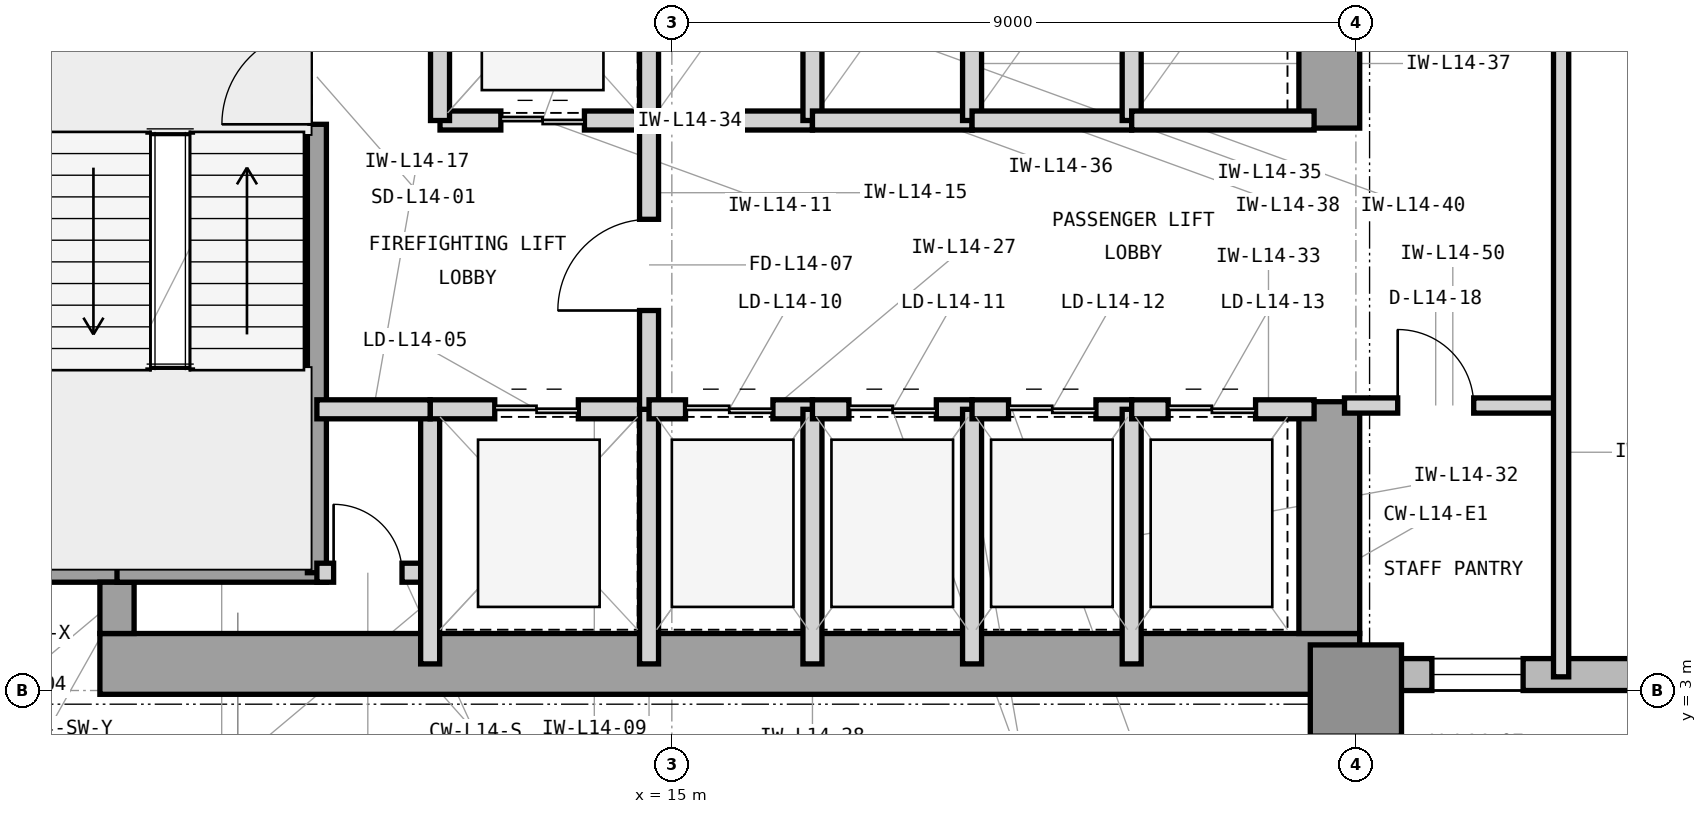
"""IFC4 building model, lengths in metres.
Left out: names, types, materials, properties, quantities, classifications, styles, units other than length and angle.
Written with IfcOpenShell. Run it as: python <this file> out.ifc"""

import sys

from ifc_helpers import new_model, si_unit, direction, frame, frame_2d, origin, origin_2d, place, context, subcontext, project, spatial, rectangle, extrude, element, fill, save


model = new_model("IFC4")
c1 = context("Model", 3, precision=1e-05, world=origin(), true_north=direction((0.0, 1.0)))
c2 = subcontext(c1, "Body", "Model", "MODEL_VIEW")
j1 = project(units=[si_unit("LENGTHUNIT", "METRE"), si_unit("PLANEANGLEUNIT", "RADIAN")], contexts=[c1])
p1 = place(None, origin())
s1 = spatial("IfcSite", under=j1, at=p1, CompositionType="ELEMENT")
p2 = place(p1, origin())
s2 = spatial("IfcBuilding", under=s1, at=p2, CompositionType="ELEMENT")
p3 = place(p2, frame((0.0, 0.0, 63.6)))
s3 = spatial("IfcBuildingStorey", under=s2, at=p3, CompositionType="ELEMENT", Elevation=63.6)
p4 = place(p3, frame((7.475, 3.35, 0.0), z_axis=(0.0, 0.0, 1.0), x_axis=(1.0, 0.0, 0.0)))
e1 = element("IfcWall", 1, at=p4, inside=s3, PredefinedType="SHEAR", context=c2, shape_type="SweptSolid", body=[
    extrude(rectangle(XDim=16.575, YDim=0.8, at=frame_2d((8.288, 0.0))), origin(), (0.0, 0.0, 1.0), 4.2),
])
p5 = place(p3, frame((23.65, 3.75, 0.0), z_axis=(0.0, 0.0, 1.0), x_axis=(0.0, 1.0, 0.0)))
e2 = element("IfcWall", 2, at=p5, inside=s3, PredefinedType="SHEAR", context=c2, shape_type="SweptSolid", body=[
    extrude(rectangle(XDim=3.05, YDim=0.8, at=frame_2d((1.525, 0.0))), origin(), (0.0, 0.0, 1.0), 4.2),
])
p6 = place(p3, frame((23.65, 10.4, 0.0), z_axis=(0.0, 0.0, 1.0), x_axis=(0.0, 1.0, 0.0)))
e3 = element("IfcWall", 3, at=p6, inside=s3, PredefinedType="SHEAR", context=c2, shape_type="SweptSolid", body=[
    extrude(rectangle(XDim=3.2, YDim=0.8, at=frame_2d((1.6, 0.0))), origin(), (0.0, 0.0, 1.0), 4.2),
])
p7 = place(p3, frame((6.75, 4.65, 0.0), z_axis=(0.0, 0.0, 1.0), x_axis=(1.0, 0.0, 0.0)))
e4 = element("IfcWall", 4, at=p7, inside=s3, PredefinedType="SHEAR", context=c2, shape_type="SweptSolid", body=[
    extrude(rectangle(XDim=1.175, YDim=0.45, at=frame_2d((0.587, 0.0))), origin(), (0.0, 0.0, 1.0), 4.2),
])
p8 = place(p3, frame((7.7, 3.75, 0.0), z_axis=(0.0, 0.0, 1.0), x_axis=(0.0, 1.0, 0.0)))
e5 = element("IfcWall", 5, at=p8, inside=s3, PredefinedType="SHEAR", context=c2, shape_type="SweptSolid", body=[
    extrude(rectangle(XDim=0.675, YDim=0.45, at=frame_2d((0.337, 0.0))), origin(), (0.0, 0.0, 1.0), 4.2),
])
p9 = place(p3, frame((24.0, 3.0, 0.0), z_axis=(0.0, 0.0, 1.0), x_axis=(1.0, 0.0, 0.0)))
e6 = element("IfcColumn", 6, at=p9, inside=s3, PredefinedType="COLUMN", context=c2, shape_type="SweptSolid", body=[
    extrude(rectangle(XDim=1.2, YDim=1.2, at=origin_2d()), origin(), (0.0, 0.0, 1.0), 4.2),
])
p10 = place(p3, frame((23.9, 3.21, 0.0), z_axis=(0.0, 0.0, 1.0), x_axis=(1.0, 0.0, 0.0)))
e7 = element("IfcWall", 7, at=p10, inside=s3, PredefinedType="STANDARD", context=c2, shape_type="SweptSolid", body=[
    extrude(rectangle(XDim=40.5, YDim=0.42, at=frame_2d((20.25, 0.0))), origin(), (0.0, 0.0, 1.0), 3.98),
])
p11 = place(p10, frame((1.1, 0.0, 0.85)))
e8 = element("IfcOpeningElement", 8, at=p11, cuts=e7, PredefinedType="OPENING", context=c2, shape_type="SweptSolid", body=[
    extrude(rectangle(XDim=1.2, YDim=2.45, at=frame_2d((0.6, 1.225))), frame((0.0, 0.22, 0.0), z_axis=(0.0, -1.0, 0.0), x_axis=(1.0, 0.0, 0.0)), (0.0, 0.0, 1.0), 0.44),
])
p12 = place(p10, frame((5.136, 0.0, 0.85)))
e9 = element("IfcOpeningElement", 9, at=p12, cuts=e7, PredefinedType="OPENING", context=c2, shape_type="SweptSolid", body=[
    extrude(rectangle(XDim=2.8, YDim=2.45, at=frame_2d((1.4, 1.225))), frame((0.0, 0.22, 0.0), z_axis=(0.0, -1.0, 0.0), x_axis=(1.0, 0.0, 0.0)), (0.0, 0.0, 1.0), 0.44),
])
p13 = place(p10, frame((12.636, 0.0, 0.85)))
e10 = element("IfcOpeningElement", 10, at=p13, cuts=e7, PredefinedType="OPENING", context=c2, shape_type="SweptSolid", body=[
    extrude(rectangle(XDim=2.8, YDim=2.45, at=frame_2d((1.4, 1.225))), frame((0.0, 0.22, 0.0), z_axis=(0.0, -1.0, 0.0), x_axis=(1.0, 0.0, 0.0)), (0.0, 0.0, 1.0), 0.44),
])
p14 = place(p10, frame((20.336, 0.0, 0.85)))
e11 = element("IfcOpeningElement", 11, at=p14, cuts=e7, PredefinedType="OPENING", context=c2, shape_type="SweptSolid", body=[
    extrude(rectangle(XDim=2.8, YDim=2.45, at=frame_2d((1.4, 1.225))), frame((0.0, 0.22, 0.0), z_axis=(0.0, -1.0, 0.0), x_axis=(1.0, 0.0, 0.0)), (0.0, 0.0, 1.0), 0.44),
])
p15 = place(p10, frame((30.886, 0.0, 0.85)))
e12 = element("IfcOpeningElement", 12, at=p15, cuts=e7, PredefinedType="OPENING", context=c2, shape_type="SweptSolid", body=[
    extrude(rectangle(XDim=1.2, YDim=2.45, at=frame_2d((0.6, 1.225))), frame((0.0, 0.22, 0.0), z_axis=(0.0, -1.0, 0.0), x_axis=(1.0, 0.0, 0.0)), (0.0, 0.0, 1.0), 0.44),
])
p16 = place(p3, frame((7.7, 4.55, 0.0), z_axis=(0.0, 0.0, 1.0), x_axis=(1.0, 0.0, 0.0)))
e13 = element("IfcWall", 13, at=p16, inside=s3, PredefinedType="SHEAR", context=c2, shape_type="SweptSolid", body=[
    extrude(rectangle(XDim=2.755, YDim=0.25, at=frame_2d((1.377, 0.0))), origin(), (0.0, 0.0, 1.0), 4.2),
])
p17 = place(p3, frame((10.33, 4.55, 0.0), z_axis=(0.0, 0.0, 1.0), x_axis=(0.0, 1.0, 0.0)))
e14 = element("IfcWall", 14, at=p17, inside=s3, PredefinedType="SHEAR", context=c2, shape_type="SweptSolid", body=[
    extrude(rectangle(XDim=7.45, YDim=0.25, at=frame_2d((3.725, 0.0))), origin(), (0.0, 0.0, 1.0), 4.2),
])
p18 = place(p17, frame((5.9, 0.0, 0.0)))
e15 = element("IfcOpeningElement", 15, at=p18, cuts=e14, PredefinedType="OPENING", context=c2, shape_type="SweptSolid", body=[
    extrude(rectangle(XDim=1.25, YDim=2.2, at=frame_2d((0.625, 1.1))), frame((0.0, 0.135, 0.0), z_axis=(0.0, -1.0, 0.0), x_axis=(1.0, 0.0, 0.0)), (0.0, 0.0, 1.0), 0.27),
])
p19 = place(p3, frame((10.33, 4.55, 0.0), z_axis=(0.0, 0.0, 1.0), x_axis=(1.0, 0.0, 0.0)))
e16 = element("IfcWall", 16, at=p19, inside=s3, PredefinedType="PARTITIONING", context=c2, shape_type="SweptSolid", body=[
    extrude(rectangle(XDim=1.49, YDim=0.25, at=frame_2d((0.745, 0.0))), origin(), (0.0, 0.0, 1.0), 3.97),
])
p20 = place(p19, frame((0.22, 0.0, 0.0)))
e17 = element("IfcOpeningElement", 17, at=p20, cuts=e16, PredefinedType="OPENING", context=c2, shape_type="SweptSolid", body=[
    extrude(rectangle(XDim=0.9, YDim=2.1, at=frame_2d((0.45, 1.05))), frame((0.0, 0.135, 0.0), z_axis=(0.0, -1.0, 0.0), x_axis=(1.0, 0.0, 0.0)), (0.0, 0.0, 1.0), 0.27),
])
p21 = place(p3, frame((11.82, 3.35, 0.0), z_axis=(0.0, 0.0, 1.0), x_axis=(0.0, 1.0, 0.0)))
e18 = element("IfcWall", 18, at=p21, inside=s3, PredefinedType="PARTITIONING", context=c2, shape_type="SweptSolid", body=[
    extrude(rectangle(XDim=3.35, YDim=0.25, at=frame_2d((1.675, 0.0))), origin(), (0.0, 0.0, 1.0), 3.97),
])
p22 = place(p3, frame((11.82, 6.7, 0.0), z_axis=(0.0, 0.0, 1.0), x_axis=(1.0, 0.0, 0.0)))
e19 = element("IfcWall", 19, at=p22, inside=s3, PredefinedType="PARTITIONING", context=c2, shape_type="SweptSolid", body=[
    extrude(rectangle(XDim=2.88, YDim=0.25, at=frame_2d((1.44, 0.0))), origin(), (0.0, 0.0, 1.0), 3.426),
])
p23 = place(p22, frame((0.85, 0.0, 0.0)))
e20 = element("IfcOpeningElement", 20, at=p23, cuts=e19, PredefinedType="OPENING", context=c2, shape_type="SweptSolid", body=[
    extrude(rectangle(XDim=1.1, YDim=2.25, at=frame_2d((0.55, 1.125))), frame((0.0, 0.135, 0.0), z_axis=(0.0, -1.0, 0.0), x_axis=(1.0, 0.0, 0.0)), (0.0, 0.0, 1.0), 0.27),
])
p24 = place(p3, frame((14.7, 3.35, 0.0), z_axis=(0.0, 0.0, 1.0), x_axis=(0.0, 1.0, 0.0)))
e21 = element("IfcWall", 21, at=p24, inside=s3, PredefinedType="PARTITIONING", context=c2, shape_type="SweptSolid", body=[
    extrude(rectangle(XDim=3.35, YDim=0.25, at=frame_2d((1.675, 0.0))), origin(), (0.0, 0.0, 1.0), 3.97),
])
p25 = place(p3, frame((11.95, 10.5, 0.0), z_axis=(0.0, 0.0, 1.0), x_axis=(1.0, 0.0, 0.0)))
e22 = element("IfcWall", 22, at=p25, inside=s3, PredefinedType="PARTITIONING", context=c2, shape_type="SweptSolid", body=[
    extrude(rectangle(XDim=2.75, YDim=0.25, at=frame_2d((1.375, 0.0))), origin(), (0.0, 0.0, 1.0), 3.426),
])
p26 = place(p25, frame((0.8, 0.0, 0.0)))
e23 = element("IfcOpeningElement", 23, at=p26, cuts=e22, PredefinedType="OPENING", context=c2, shape_type="SweptSolid", body=[
    extrude(rectangle(XDim=1.1, YDim=2.25, at=frame_2d((0.55, 1.125))), frame((0.0, 0.135, 0.0), z_axis=(0.0, -1.0, 0.0), x_axis=(1.0, 0.0, 0.0)), (0.0, 0.0, 1.0), 0.27),
])
for number, where, z_axis, x_axis in (
    (24, (11.95, 10.5, 0.0), (0.0, 0.0, 1.0), (0.0, 1.0, 0.0)),
    (25, (14.7, 10.5, 0.0), (0.0, 0.0, 1.0), (0.0, 1.0, 0.0)),
):
    element("IfcWall", number, at=place(p3, frame(where, z_axis=z_axis, x_axis=x_axis)), inside=s3, PredefinedType="PARTITIONING", context=c2, shape_type="SweptSolid", body=[
        extrude(rectangle(XDim=3.0, YDim=0.25, at=frame_2d((1.5, 0.0))), origin(), (0.0, 0.0, 1.0), 3.97),
    ])
p27 = place(p3, frame((14.7, 6.7, 0.0), z_axis=(0.0, 0.0, 1.0), x_axis=(0.0, 1.0, 0.0)))
e26 = element("IfcWall", 26, at=p27, inside=s3, PredefinedType="PARTITIONING", context=c2, shape_type="SweptSolid", body=[
    extrude(rectangle(XDim=3.8, YDim=0.25, at=frame_2d((1.9, 0.0))), origin(), (0.0, 0.0, 1.0), 3.97),
])
p28 = place(p27, frame((1.3, 0.0, 0.0)))
e27 = element("IfcOpeningElement", 27, at=p28, cuts=e26, PredefinedType="OPENING", context=c2, shape_type="SweptSolid", body=[
    extrude(rectangle(XDim=1.2, YDim=2.2, at=frame_2d((0.6, 1.1))), frame((0.0, 0.135, 0.0), z_axis=(0.0, -1.0, 0.0), x_axis=(1.0, 0.0, 0.0)), (0.0, 0.0, 1.0), 0.27),
])
p29 = place(p3, frame((10.33, 6.7, 0.0), z_axis=(0.0, 0.0, 1.0), x_axis=(1.0, 0.0, 0.0)))
e28 = element("IfcWall", 28, at=p29, inside=s3, PredefinedType="PARTITIONING", context=c2, shape_type="SweptSolid", body=[
    extrude(rectangle(XDim=1.49, YDim=0.25, at=frame_2d((0.745, 0.0))), origin(), (0.0, 0.0, 1.0), 3.426),
])
p30 = place(p3, frame((14.7, 6.7, 0.0), z_axis=(0.0, 0.0, 1.0), x_axis=(1.0, 0.0, 0.0)))
e29 = element("IfcWall", 29, at=p30, inside=s3, PredefinedType="PARTITIONING", context=c2, shape_type="SweptSolid", body=[
    extrude(rectangle(XDim=2.15, YDim=0.25, at=frame_2d((1.075, 0.0))), origin(), (0.0, 0.0, 1.0), 3.426),
])
p31 = place(p30, frame((0.48, 0.0, 0.0)))
e30 = element("IfcOpeningElement", 30, at=p31, cuts=e29, PredefinedType="OPENING", context=c2, shape_type="SweptSolid", body=[
    extrude(rectangle(XDim=1.15, YDim=2.25, at=frame_2d((0.575, 1.125))), frame((0.0, 0.135, 0.0), z_axis=(0.0, -1.0, 0.0), x_axis=(1.0, 0.0, 0.0)), (0.0, 0.0, 1.0), 0.27),
])
p32 = place(p3, frame((16.85, 3.35, 0.0), z_axis=(0.0, 0.0, 1.0), x_axis=(0.0, 1.0, 0.0)))
e31 = element("IfcWall", 31, at=p32, inside=s3, PredefinedType="PARTITIONING", context=c2, shape_type="SweptSolid", body=[
    extrude(rectangle(XDim=3.35, YDim=0.25, at=frame_2d((1.675, 0.0))), origin(), (0.0, 0.0, 1.0), 3.97),
])
p33 = place(p3, frame((16.85, 6.7, 0.0), z_axis=(0.0, 0.0, 1.0), x_axis=(1.0, 0.0, 0.0)))
e32 = element("IfcWall", 32, at=p33, inside=s3, PredefinedType="PARTITIONING", context=c2, shape_type="SweptSolid", body=[
    extrude(rectangle(XDim=2.1, YDim=0.25, at=frame_2d((1.05, 0.0))), origin(), (0.0, 0.0, 1.0), 3.426),
])
p34 = place(p33, frame((0.48, 0.0, 0.0)))
e33 = element("IfcOpeningElement", 33, at=p34, cuts=e32, PredefinedType="OPENING", context=c2, shape_type="SweptSolid", body=[
    extrude(rectangle(XDim=1.15, YDim=2.25, at=frame_2d((0.575, 1.125))), frame((0.0, 0.135, 0.0), z_axis=(0.0, -1.0, 0.0), x_axis=(1.0, 0.0, 0.0)), (0.0, 0.0, 1.0), 0.27),
])
p35 = place(p3, frame((18.95, 3.35, 0.0), z_axis=(0.0, 0.0, 1.0), x_axis=(0.0, 1.0, 0.0)))
e34 = element("IfcWall", 34, at=p35, inside=s3, PredefinedType="PARTITIONING", context=c2, shape_type="SweptSolid", body=[
    extrude(rectangle(XDim=3.35, YDim=0.25, at=frame_2d((1.675, 0.0))), origin(), (0.0, 0.0, 1.0), 3.97),
])
p36 = place(p3, frame((18.95, 6.7, 0.0), z_axis=(0.0, 0.0, 1.0), x_axis=(1.0, 0.0, 0.0)))
e35 = element("IfcWall", 35, at=p36, inside=s3, PredefinedType="PARTITIONING", context=c2, shape_type="SweptSolid", body=[
    extrude(rectangle(XDim=2.1, YDim=0.25, at=frame_2d((1.05, 0.0))), origin(), (0.0, 0.0, 1.0), 3.426),
])
p37 = place(p36, frame((0.48, 0.0, 0.0)))
e36 = element("IfcOpeningElement", 36, at=p37, cuts=e35, PredefinedType="OPENING", context=c2, shape_type="SweptSolid", body=[
    extrude(rectangle(XDim=1.15, YDim=2.25, at=frame_2d((0.575, 1.125))), frame((0.0, 0.135, 0.0), z_axis=(0.0, -1.0, 0.0), x_axis=(1.0, 0.0, 0.0)), (0.0, 0.0, 1.0), 0.27),
])
p38 = place(p3, frame((21.05, 3.35, 0.0), z_axis=(0.0, 0.0, 1.0), x_axis=(0.0, 1.0, 0.0)))
e37 = element("IfcWall", 37, at=p38, inside=s3, PredefinedType="PARTITIONING", context=c2, shape_type="SweptSolid", body=[
    extrude(rectangle(XDim=3.35, YDim=0.25, at=frame_2d((1.675, 0.0))), origin(), (0.0, 0.0, 1.0), 3.97),
])
p39 = place(p3, frame((21.05, 6.7, 0.0), z_axis=(0.0, 0.0, 1.0), x_axis=(1.0, 0.0, 0.0)))
e38 = element("IfcWall", 38, at=p39, inside=s3, PredefinedType="PARTITIONING", context=c2, shape_type="SweptSolid", body=[
    extrude(rectangle(XDim=2.4, YDim=0.25, at=frame_2d((1.2, 0.0))), origin(), (0.0, 0.0, 1.0), 3.426),
])
p40 = place(p39, frame((0.48, 0.0, 0.0)))
e39 = element("IfcOpeningElement", 39, at=p40, cuts=e38, PredefinedType="OPENING", context=c2, shape_type="SweptSolid", body=[
    extrude(rectangle(XDim=1.15, YDim=2.25, at=frame_2d((0.575, 1.125))), frame((0.0, 0.135, 0.0), z_axis=(0.0, -1.0, 0.0), x_axis=(1.0, 0.0, 0.0)), (0.0, 0.0, 1.0), 0.27),
])
p41 = place(p3, frame((14.7, 10.5, 0.0), z_axis=(0.0, 0.0, 1.0), x_axis=(1.0, 0.0, 0.0)))
e40 = element("IfcWall", 40, at=p41, inside=s3, PredefinedType="PARTITIONING", context=c2, shape_type="SweptSolid", body=[
    extrude(rectangle(XDim=2.15, YDim=0.25, at=frame_2d((1.075, 0.0))), origin(), (0.0, 0.0, 1.0), 3.426),
])
p42 = place(p3, frame((16.85, 10.5, 0.0), z_axis=(0.0, 0.0, 1.0), x_axis=(0.0, 1.0, 0.0)))
e41 = element("IfcWall", 41, at=p42, inside=s3, PredefinedType="PARTITIONING", context=c2, shape_type="SweptSolid", body=[
    extrude(rectangle(XDim=3.0, YDim=0.25, at=frame_2d((1.5, 0.0))), origin(), (0.0, 0.0, 1.0), 3.97),
])
p43 = place(p3, frame((16.85, 10.5, 0.0), z_axis=(0.0, 0.0, 1.0), x_axis=(1.0, 0.0, 0.0)))
e42 = element("IfcWall", 42, at=p43, inside=s3, PredefinedType="PARTITIONING", context=c2, shape_type="SweptSolid", body=[
    extrude(rectangle(XDim=2.1, YDim=0.25, at=frame_2d((1.05, 0.0))), origin(), (0.0, 0.0, 1.0), 3.426),
])
p44 = place(p3, frame((18.95, 10.5, 0.0), z_axis=(0.0, 0.0, 1.0), x_axis=(0.0, 1.0, 0.0)))
e43 = element("IfcWall", 43, at=p44, inside=s3, PredefinedType="PARTITIONING", context=c2, shape_type="SweptSolid", body=[
    extrude(rectangle(XDim=3.0, YDim=0.25, at=frame_2d((1.5, 0.0))), origin(), (0.0, 0.0, 1.0), 3.97),
])
p45 = place(p3, frame((18.95, 10.5, 0.0), z_axis=(0.0, 0.0, 1.0), x_axis=(1.0, 0.0, 0.0)))
e44 = element("IfcWall", 44, at=p45, inside=s3, PredefinedType="PARTITIONING", context=c2, shape_type="SweptSolid", body=[
    extrude(rectangle(XDim=2.1, YDim=0.25, at=frame_2d((1.05, 0.0))), origin(), (0.0, 0.0, 1.0), 3.426),
])
p46 = place(p3, frame((21.05, 10.5, 0.0), z_axis=(0.0, 0.0, 1.0), x_axis=(0.0, 1.0, 0.0)))
e45 = element("IfcWall", 45, at=p46, inside=s3, PredefinedType="PARTITIONING", context=c2, shape_type="SweptSolid", body=[
    extrude(rectangle(XDim=3.0, YDim=0.25, at=frame_2d((1.5, 0.0))), origin(), (0.0, 0.0, 1.0), 3.97),
])
p47 = place(p3, frame((21.05, 10.5, 0.0), z_axis=(0.0, 0.0, 1.0), x_axis=(1.0, 0.0, 0.0)))
e46 = element("IfcWall", 46, at=p47, inside=s3, PredefinedType="PARTITIONING", context=c2, shape_type="SweptSolid", body=[
    extrude(rectangle(XDim=2.4, YDim=0.25, at=frame_2d((1.2, 0.0))), origin(), (0.0, 0.0, 1.0), 3.426),
])
p48 = place(p3, frame((23.85, 6.75, 0.0), z_axis=(0.0, 0.0, 1.0), x_axis=(1.0, 0.0, 0.0)))
e47 = element("IfcWall", 47, at=p48, inside=s3, PredefinedType="PARTITIONING", context=c2, shape_type="SweptSolid", body=[
    extrude(rectangle(XDim=2.85, YDim=0.2, at=frame_2d((1.425, 0.0))), origin(), (0.0, 0.0, 1.0), 3.97),
])
p49 = place(p48, frame((0.7, 0.0, 0.0)))
e48 = element("IfcOpeningElement", 48, at=p49, cuts=e47, PredefinedType="OPENING", context=c2, shape_type="SweptSolid", body=[
    extrude(rectangle(XDim=1.0, YDim=2.15, at=frame_2d((0.5, 1.075))), frame((0.0, 0.11, 0.0), z_axis=(0.0, -1.0, 0.0), x_axis=(1.0, 0.0, 0.0)), (0.0, 0.0, 1.0), 0.22),
])
p50 = place(p3, frame((26.7, 3.18, 0.0), z_axis=(0.0, 0.0, 1.0), x_axis=(0.0, 1.0, 0.0)))
e49 = element("IfcWall", 49, at=p50, inside=s3, PredefinedType="PARTITIONING", context=c2, shape_type="SweptSolid", body=[
    extrude(rectangle(XDim=11.82, YDim=0.2, at=frame_2d((5.91, 0.0))), origin(), (0.0, 0.0, 1.0), 3.97),
])
p51 = place(p18, origin())
e50 = element("IfcDoor", 50, at=p51, inside=s3, OperationType="SINGLE_SWING_LEFT", PredefinedType="DOOR", context=c2, shape_type="SweptSolid", body=[
    extrude(rectangle(XDim=1.25, YDim=2.2, at=frame_2d((0.625, 1.1))), frame((0.0, 0.025, 0.0), z_axis=(0.0, -1.0, 0.0), x_axis=(1.0, 0.0, 0.0)), (0.0, 0.0, 1.0), 0.05),
])
fill(e15, e50)
p52 = place(p20, origin())
e51 = element("IfcDoor", 51, at=p52, inside=s3, OperationType="SINGLE_SWING_LEFT", PredefinedType="TRAPDOOR", context=c2, shape_type="SweptSolid", body=[
    extrude(rectangle(XDim=0.9, YDim=2.1, at=frame_2d((0.45, 1.05))), frame((0.0, 0.025, 0.0), z_axis=(0.0, -1.0, 0.0), x_axis=(1.0, 0.0, 0.0)), (0.0, 0.0, 1.0), 0.05),
])
fill(e17, e51)
p53 = place(p23, origin())
e52 = element("IfcDoor", 52, at=p53, inside=s3, OperationType="DOUBLE_DOOR_SLIDING", PredefinedType="DOOR", context=c2, shape_type="SweptSolid", body=[
    extrude(rectangle(XDim=1.1, YDim=2.25, at=frame_2d((0.55, 1.125))), frame((0.0, 0.025, 0.0), z_axis=(0.0, -1.0, 0.0), x_axis=(1.0, 0.0, 0.0)), (0.0, 0.0, 1.0), 0.05),
])
fill(e20, e52)
p54 = place(p26, origin())
e53 = element("IfcDoor", 53, at=p54, inside=s3, OperationType="DOUBLE_DOOR_SLIDING", PredefinedType="DOOR", context=c2, shape_type="SweptSolid", body=[
    extrude(rectangle(XDim=1.1, YDim=2.25, at=frame_2d((0.55, 1.125))), frame((0.0, 0.025, 0.0), z_axis=(0.0, -1.0, 0.0), x_axis=(1.0, 0.0, 0.0)), (0.0, 0.0, 1.0), 0.05),
])
fill(e23, e53)
p55 = place(p28, origin())
e54 = element("IfcDoor", 54, at=p55, inside=s3, OperationType="SINGLE_SWING_LEFT", PredefinedType="DOOR", context=c2, shape_type="SweptSolid", body=[
    extrude(rectangle(XDim=1.2, YDim=2.2, at=frame_2d((0.6, 1.1))), frame((0.0, 0.025, 0.0), z_axis=(0.0, -1.0, 0.0), x_axis=(1.0, 0.0, 0.0)), (0.0, 0.0, 1.0), 0.05),
])
fill(e27, e54)
p56 = place(p31, origin())
e55 = element("IfcDoor", 55, at=p56, inside=s3, OperationType="DOUBLE_DOOR_SLIDING", PredefinedType="DOOR", context=c2, shape_type="SweptSolid", body=[
    extrude(rectangle(XDim=1.15, YDim=2.25, at=frame_2d((0.575, 1.125))), frame((0.0, 0.025, 0.0), z_axis=(0.0, -1.0, 0.0), x_axis=(1.0, 0.0, 0.0)), (0.0, 0.0, 1.0), 0.05),
])
fill(e30, e55)
p57 = place(p34, origin())
e56 = element("IfcDoor", 56, at=p57, inside=s3, OperationType="DOUBLE_DOOR_SLIDING", PredefinedType="DOOR", context=c2, shape_type="SweptSolid", body=[
    extrude(rectangle(XDim=1.15, YDim=2.25, at=frame_2d((0.575, 1.125))), frame((0.0, 0.025, 0.0), z_axis=(0.0, -1.0, 0.0), x_axis=(1.0, 0.0, 0.0)), (0.0, 0.0, 1.0), 0.05),
])
fill(e33, e56)
p58 = place(p37, origin())
e57 = element("IfcDoor", 57, at=p58, inside=s3, OperationType="DOUBLE_DOOR_SLIDING", PredefinedType="DOOR", context=c2, shape_type="SweptSolid", body=[
    extrude(rectangle(XDim=1.15, YDim=2.25, at=frame_2d((0.575, 1.125))), frame((0.0, 0.025, 0.0), z_axis=(0.0, -1.0, 0.0), x_axis=(1.0, 0.0, 0.0)), (0.0, 0.0, 1.0), 0.05),
])
fill(e36, e57)
p59 = place(p40, origin())
e58 = element("IfcDoor", 58, at=p59, inside=s3, OperationType="DOUBLE_DOOR_SLIDING", PredefinedType="DOOR", context=c2, shape_type="SweptSolid", body=[
    extrude(rectangle(XDim=1.15, YDim=2.25, at=frame_2d((0.575, 1.125))), frame((0.0, 0.025, 0.0), z_axis=(0.0, -1.0, 0.0), x_axis=(1.0, 0.0, 0.0)), (0.0, 0.0, 1.0), 0.05),
])
fill(e39, e58)
p60 = place(p49, origin())
e59 = element("IfcDoor", 59, at=p60, inside=s3, OperationType="SINGLE_SWING_LEFT", PredefinedType="DOOR", context=c2, shape_type="SweptSolid", body=[
    extrude(rectangle(XDim=1.0, YDim=2.15, at=frame_2d((0.5, 1.075))), frame((0.0, 0.025, 0.0), z_axis=(0.0, -1.0, 0.0), x_axis=(1.0, 0.0, 0.0)), (0.0, 0.0, 1.0), 0.05),
])
fill(e48, e59)
p61 = place(p11, origin())
e60 = element("IfcWindow", 60, at=p61, inside=s3, PartitioningType="SINGLE_PANEL", PredefinedType="WINDOW", context=c2, shape_type="SweptSolid", body=[
    extrude(rectangle(XDim=1.2, YDim=2.45, at=frame_2d((0.6, 1.225))), frame((0.0, 0.11, 0.0), z_axis=(0.0, -1.0, 0.0), x_axis=(1.0, 0.0, 0.0)), (0.0, 0.0, 1.0), 0.06),
])
fill(e8, e60)
save(model, sys.argv[1])
